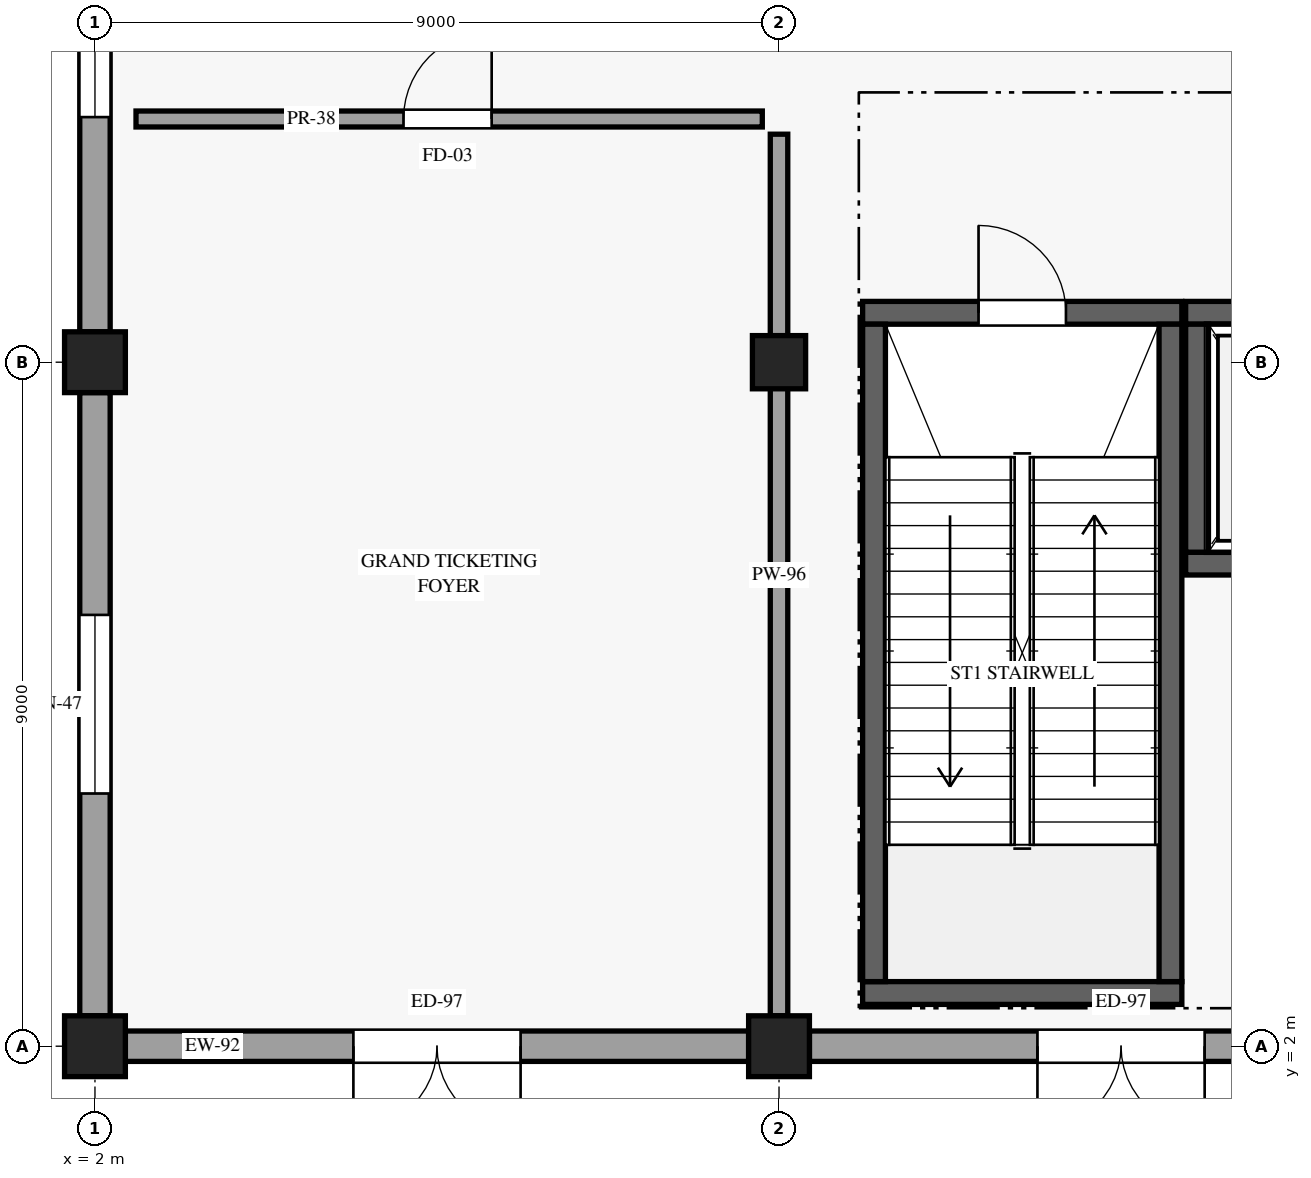
"""IFC4 building model, lengths in metres.
Left out: names, types, materials, properties, quantities, classifications, styles, units other than length and angle.
Written with IfcOpenShell. Run it as: python <this file> out.ifc"""

import sys

from ifc_helpers import new_model, si_unit, direction, frame, frame_2d, origin, origin_2d, place, context, subcontext, project, spatial, rectangle, extrude, element, fill, save


model = new_model("IFC4")
c1 = context("Model", 3, precision=1e-05, world=origin(), true_north=direction((0.0, 1.0)))
c2 = subcontext(c1, "Body", "Model", "MODEL_VIEW")
j1 = project(units=[si_unit("LENGTHUNIT", "METRE"), si_unit("PLANEANGLEUNIT", "RADIAN")], contexts=[c1])
p1 = place(None, origin())
s1 = spatial("IfcSite", under=j1, at=p1, CompositionType="ELEMENT")
p2 = place(p1, origin())
s2 = spatial("IfcBuilding", under=s1, at=p2, CompositionType="ELEMENT")
p3 = place(p2, origin())
s3 = spatial("IfcBuildingStorey", under=s2, at=p3, CompositionType="ELEMENT", Elevation=0.0)
for number, where, z_axis, x_axis in (
    (1, (2.0, 2.0, 0.0), (0.0, 0.0, 1.0), (1.0, 0.0, 0.0)),
    (2, (2.0, 11.0, 0.0), (0.0, 0.0, 1.0), (1.0, 0.0, 0.0)),
    (3, (11.0, 2.0, 0.0), (0.0, 0.0, 1.0), (1.0, 0.0, 0.0)),
):
    element("IfcColumn", number, at=place(p3, frame(where, z_axis=z_axis, x_axis=x_axis)), inside=s3, PredefinedType="COLUMN", context=c2, shape_type="SweptSolid", body=[
        extrude(rectangle(XDim=0.8, YDim=0.8, at=origin_2d()), origin(), (0.0, 0.0, 1.0), 5.4),
    ])
p4 = place(p3, frame((11.0, 11.0, 0.0), z_axis=(0.0, 0.0, 1.0), x_axis=(1.0, 0.0, 0.0)))
e4 = element("IfcColumn", 4, at=p4, inside=s3, PredefinedType="COLUMN", context=c2, shape_type="SweptSolid", body=[
    extrude(rectangle(XDim=0.7, YDim=0.7, at=origin_2d()), origin(), (0.0, 0.0, 1.0), 5.4),
])
p5 = place(p3, frame((2.4, 2.0, 0.0), z_axis=(0.0, 0.0, 1.0), x_axis=(1.0, 0.0, 0.0)))
e5 = element("IfcWall", 5, at=p5, inside=s3, PredefinedType="STANDARD", context=c2, shape_type="SweptSolid", body=[
    extrude(rectangle(XDim=8.2, YDim=0.4, at=frame_2d((4.1, 0.0))), origin(), (0.0, 0.0, 1.0), 4.095),
])
p6 = place(p5, frame((5.2, 0.0, 0.0), z_axis=(0.0, 0.0, 1.0), x_axis=(-1.0, 0.0, 0.0)))
e6 = element("IfcOpeningElement", 6, at=p6, cuts=e5, PredefinedType="OPENING", context=c2, shape_type="SweptSolid", body=[
    extrude(rectangle(XDim=2.2, YDim=2.5, at=frame_2d((1.1, 1.25))), frame((0.0, 0.21, 0.0), z_axis=(0.0, -1.0, 0.0), x_axis=(1.0, 0.0, 0.0)), (0.0, 0.0, 1.0), 0.42),
])
p7 = place(p3, frame((11.4, 2.0, 0.0), z_axis=(0.0, 0.0, 1.0), x_axis=(1.0, 0.0, 0.0)))
e7 = element("IfcWall", 7, at=p7, inside=s3, PredefinedType="STANDARD", context=c2, shape_type="SweptSolid", body=[
    extrude(rectangle(XDim=8.2, YDim=0.4, at=frame_2d((4.1, 0.0))), origin(), (0.0, 0.0, 1.0), 4.095),
])
p8 = place(p7, frame((5.2, 0.0, 0.0), z_axis=(0.0, 0.0, 1.0), x_axis=(-1.0, 0.0, 0.0)))
e8 = element("IfcOpeningElement", 8, at=p8, cuts=e7, PredefinedType="OPENING", context=c2, shape_type="SweptSolid", body=[
    extrude(rectangle(XDim=2.2, YDim=2.5, at=frame_2d((1.1, 1.25))), frame((0.0, 0.21, 0.0), z_axis=(0.0, -1.0, 0.0), x_axis=(1.0, 0.0, 0.0)), (0.0, 0.0, 1.0), 0.42),
])
p9 = place(p3, frame((2.0, 2.4, 0.0), z_axis=(0.0, 0.0, 1.0), x_axis=(0.0, 1.0, 0.0)))
e9 = element("IfcWall", 9, at=p9, inside=s3, PredefinedType="STANDARD", context=c2, shape_type="SweptSolid", body=[
    extrude(rectangle(XDim=8.2, YDim=0.4, at=frame_2d((4.1, 0.0))), origin(), (0.0, 0.0, 1.0), 4.095),
])
p10 = place(p9, frame((2.925, 0.0, 0.85)))
e10 = element("IfcOpeningElement", 10, at=p10, cuts=e9, PredefinedType="OPENING", context=c2, shape_type="SweptSolid", body=[
    extrude(rectangle(XDim=2.35, YDim=2.35, at=frame_2d((1.175, 1.175))), frame((0.0, 0.21, 0.0), z_axis=(0.0, -1.0, 0.0), x_axis=(1.0, 0.0, 0.0)), (0.0, 0.0, 1.0), 0.42),
])
p11 = place(p3, frame((2.0, 11.4, 0.0), z_axis=(0.0, 0.0, 1.0), x_axis=(0.0, 1.0, 0.0)))
e11 = element("IfcWall", 11, at=p11, inside=s3, PredefinedType="STANDARD", context=c2, shape_type="SweptSolid", body=[
    extrude(rectangle(XDim=8.2, YDim=0.4, at=frame_2d((4.1, 0.0))), origin(), (0.0, 0.0, 1.0), 4.095),
])
p12 = place(p11, frame((2.825, 0.0, 0.85)))
e12 = element("IfcOpeningElement", 12, at=p12, cuts=e11, PredefinedType="OPENING", context=c2, shape_type="SweptSolid", body=[
    extrude(rectangle(XDim=2.55, YDim=2.4, at=frame_2d((1.275, 1.2))), frame((0.0, 0.21, 0.0), z_axis=(0.0, -1.0, 0.0), x_axis=(1.0, 0.0, 0.0)), (0.0, 0.0, 1.0), 0.42),
])
p13 = place(p3, frame((12.1, 11.65, 0.0), z_axis=(0.0, 0.0, 1.0), x_axis=(1.0, 0.0, 0.0)))
e13 = element("IfcWall", 13, at=p13, inside=s3, PredefinedType="SHEAR", context=c2, shape_type="SweptSolid", body=[
    extrude(rectangle(XDim=4.2, YDim=0.3, at=frame_2d((2.1, 0.0))), origin(), (0.0, 0.0, 1.0), 5.12),
])
p14 = place(p13, frame((1.525, 0.0, 0.0)))
e14 = element("IfcOpeningElement", 14, at=p14, cuts=e13, PredefinedType="OPENING", context=c2, shape_type="SweptSolid", body=[
    extrude(rectangle(XDim=1.15, YDim=2.2, at=frame_2d((0.575, 1.1))), frame((0.0, 0.16, 0.0), z_axis=(0.0, -1.0, 0.0), x_axis=(1.0, 0.0, 0.0)), (0.0, 0.0, 1.0), 0.32),
])
p15 = place(p3, frame((12.1, 2.7, 0.0), z_axis=(0.0, 0.0, 1.0), x_axis=(1.0, 0.0, 0.0)))
e15 = element("IfcWall", 15, at=p15, inside=s3, PredefinedType="SHEAR", context=c2, shape_type="SweptSolid", body=[
    extrude(rectangle(XDim=4.2, YDim=0.3, at=frame_2d((2.1, 0.0))), origin(), (0.0, 0.0, 1.0), 5.12),
])
for number, where, z_axis, x_axis in (
    (16, (12.25, 2.85, 0.0), (0.0, 0.0, 1.0), (0.0, 1.0, 0.0)),
    (17, (16.15, 2.85, 0.0), (0.0, 0.0, 1.0), (0.0, 1.0, 0.0)),
):
    element("IfcWall", number, at=place(p3, frame(where, z_axis=z_axis, x_axis=x_axis)), inside=s3, PredefinedType="SHEAR", context=c2, shape_type="SweptSolid", body=[
        extrude(rectangle(XDim=8.65, YDim=0.3, at=frame_2d((4.325, 0.0))), origin(), (0.0, 0.0, 1.0), 5.12),
    ])
p16 = place(p3, frame((16.35, 11.65, 0.0), z_axis=(0.0, 0.0, 1.0), x_axis=(1.0, 0.0, 0.0)))
e18 = element("IfcWall", 18, at=p16, inside=s3, PredefinedType="SHEAR", context=c2, shape_type="SweptSolid", body=[
    extrude(rectangle(XDim=2.6, YDim=0.3, at=frame_2d((1.3, 0.0))), origin(), (0.0, 0.0, 1.0), 5.12),
])
p17 = place(p16, frame((0.75, 0.0, 0.0)))
e19 = element("IfcOpeningElement", 19, at=p17, cuts=e18, PredefinedType="OPENING", context=c2, shape_type="SweptSolid", body=[
    extrude(rectangle(XDim=1.1, YDim=2.2, at=frame_2d((0.55, 1.1))), frame((0.0, 0.16, 0.0), z_axis=(0.0, -1.0, 0.0), x_axis=(1.0, 0.0, 0.0)), (0.0, 0.0, 1.0), 0.32),
])
p18 = place(p3, frame((16.35, 8.35, 0.0), z_axis=(0.0, 0.0, 1.0), x_axis=(1.0, 0.0, 0.0)))
e20 = element("IfcWall", 20, at=p18, inside=s3, PredefinedType="SHEAR", context=c2, shape_type="SweptSolid", body=[
    extrude(rectangle(XDim=2.6, YDim=0.3, at=frame_2d((1.3, 0.0))), origin(), (0.0, 0.0, 1.0), 5.12),
])
p19 = place(p3, frame((16.5, 8.5, 0.0), z_axis=(0.0, 0.0, 1.0), x_axis=(0.0, 1.0, 0.0)))
e21 = element("IfcWall", 21, at=p19, inside=s3, PredefinedType="SHEAR", context=c2, shape_type="SweptSolid", body=[
    extrude(rectangle(XDim=3.0, YDim=0.3, at=frame_2d((1.5, 0.0))), origin(), (0.0, 0.0, 1.0), 5.12),
])
p20 = place(p3, frame((2.54, 14.2, 0.0), z_axis=(0.0, 0.0, 1.0), x_axis=(1.0, 0.0, 0.0)))
e22 = element("IfcWall", 22, at=p20, inside=s3, PredefinedType="PARTITIONING", context=c2, shape_type="SweptSolid", body=[
    extrude(rectangle(XDim=8.24, YDim=0.21, at=frame_2d((4.12, 0.0))), origin(), (0.0, 0.0, 1.0), 4.095),
])
p21 = place(p20, frame((3.519, 0.0, 0.0)))
e23 = element("IfcOpeningElement", 23, at=p21, cuts=e22, PredefinedType="OPENING", context=c2, shape_type="SweptSolid", body=[
    extrude(rectangle(XDim=1.16, YDim=2.28, at=frame_2d((0.58, 1.14))), frame((0.0, 0.115, 0.0), z_axis=(0.0, -1.0, 0.0), x_axis=(1.0, 0.0, 0.0)), (0.0, 0.0, 1.0), 0.23),
])
p22 = place(p3, frame((11.0, 2.4, 0.0), z_axis=(0.0, 0.0, 1.0), x_axis=(0.0, 1.0, 0.0)))
e24 = element("IfcWall", 24, at=p22, inside=s3, PredefinedType="PARTITIONING", context=c2, shape_type="SweptSolid", body=[
    extrude(rectangle(XDim=11.6, YDim=0.23, at=frame_2d((5.8, 0.0))), origin(), (0.0, 0.0, 1.0), 4.095),
])
p23 = place(p6, origin())
e25 = element("IfcDoor", 25, at=p23, inside=s3, OperationType="DOUBLE_DOOR_SINGLE_SWING", PredefinedType="DOOR", context=c2, shape_type="SweptSolid", body=[
    extrude(rectangle(XDim=2.2, YDim=2.5, at=frame_2d((1.1, 1.25))), frame((0.0, 0.025, 0.0), z_axis=(0.0, -1.0, 0.0), x_axis=(1.0, 0.0, 0.0)), (0.0, 0.0, 1.0), 0.05),
])
fill(e6, e25)
p24 = place(p8, origin())
e26 = element("IfcDoor", 26, at=p24, inside=s3, OperationType="DOUBLE_DOOR_SINGLE_SWING", PredefinedType="DOOR", context=c2, shape_type="SweptSolid", body=[
    extrude(rectangle(XDim=2.2, YDim=2.5, at=frame_2d((1.1, 1.25))), frame((0.0, 0.025, 0.0), z_axis=(0.0, -1.0, 0.0), x_axis=(1.0, 0.0, 0.0)), (0.0, 0.0, 1.0), 0.05),
])
fill(e8, e26)
p25 = place(p10, origin())
e27 = element("IfcWindow", 27, at=p25, inside=s3, PartitioningType="SINGLE_PANEL", PredefinedType="WINDOW", context=c2, shape_type="SweptSolid", body=[
    extrude(rectangle(XDim=2.35, YDim=2.35, at=frame_2d((1.175, 1.175))), frame((0.0, 0.03, 0.0), z_axis=(0.0, -1.0, 0.0), x_axis=(1.0, 0.0, 0.0)), (0.0, 0.0, 1.0), 0.06),
])
fill(e10, e27)
p26 = place(p12, origin())
e28 = element("IfcWindow", 28, at=p26, inside=s3, PartitioningType="SINGLE_PANEL", PredefinedType="WINDOW", context=c2, shape_type="SweptSolid", body=[
    extrude(rectangle(XDim=2.55, YDim=2.4, at=frame_2d((1.275, 1.2))), frame((0.0, 0.03, 0.0), z_axis=(0.0, -1.0, 0.0), x_axis=(1.0, 0.0, 0.0)), (0.0, 0.0, 1.0), 0.06),
])
fill(e12, e28)
p27 = place(p14, origin())
e29 = element("IfcDoor", 29, at=p27, inside=s3, OperationType="SINGLE_SWING_LEFT", PredefinedType="DOOR", context=c2, shape_type="SweptSolid", body=[
    extrude(rectangle(XDim=1.15, YDim=2.2, at=frame_2d((0.575, 1.1))), frame((0.0, 0.025, 0.0), z_axis=(0.0, -1.0, 0.0), x_axis=(1.0, 0.0, 0.0)), (0.0, 0.0, 1.0), 0.05),
])
fill(e14, e29)
p28 = place(p21, origin())
e30 = element("IfcDoor", 30, at=p28, inside=s3, OperationType="SINGLE_SWING_RIGHT", PredefinedType="DOOR", context=c2, shape_type="SweptSolid", body=[
    extrude(rectangle(XDim=1.16, YDim=2.28, at=frame_2d((0.58, 1.14))), frame((0.0, 0.025, 0.0), z_axis=(0.0, -1.0, 0.0), x_axis=(1.0, 0.0, 0.0)), (0.0, 0.0, 1.0), 0.05),
])
fill(e23, e30)
save(model, sys.argv[1])
